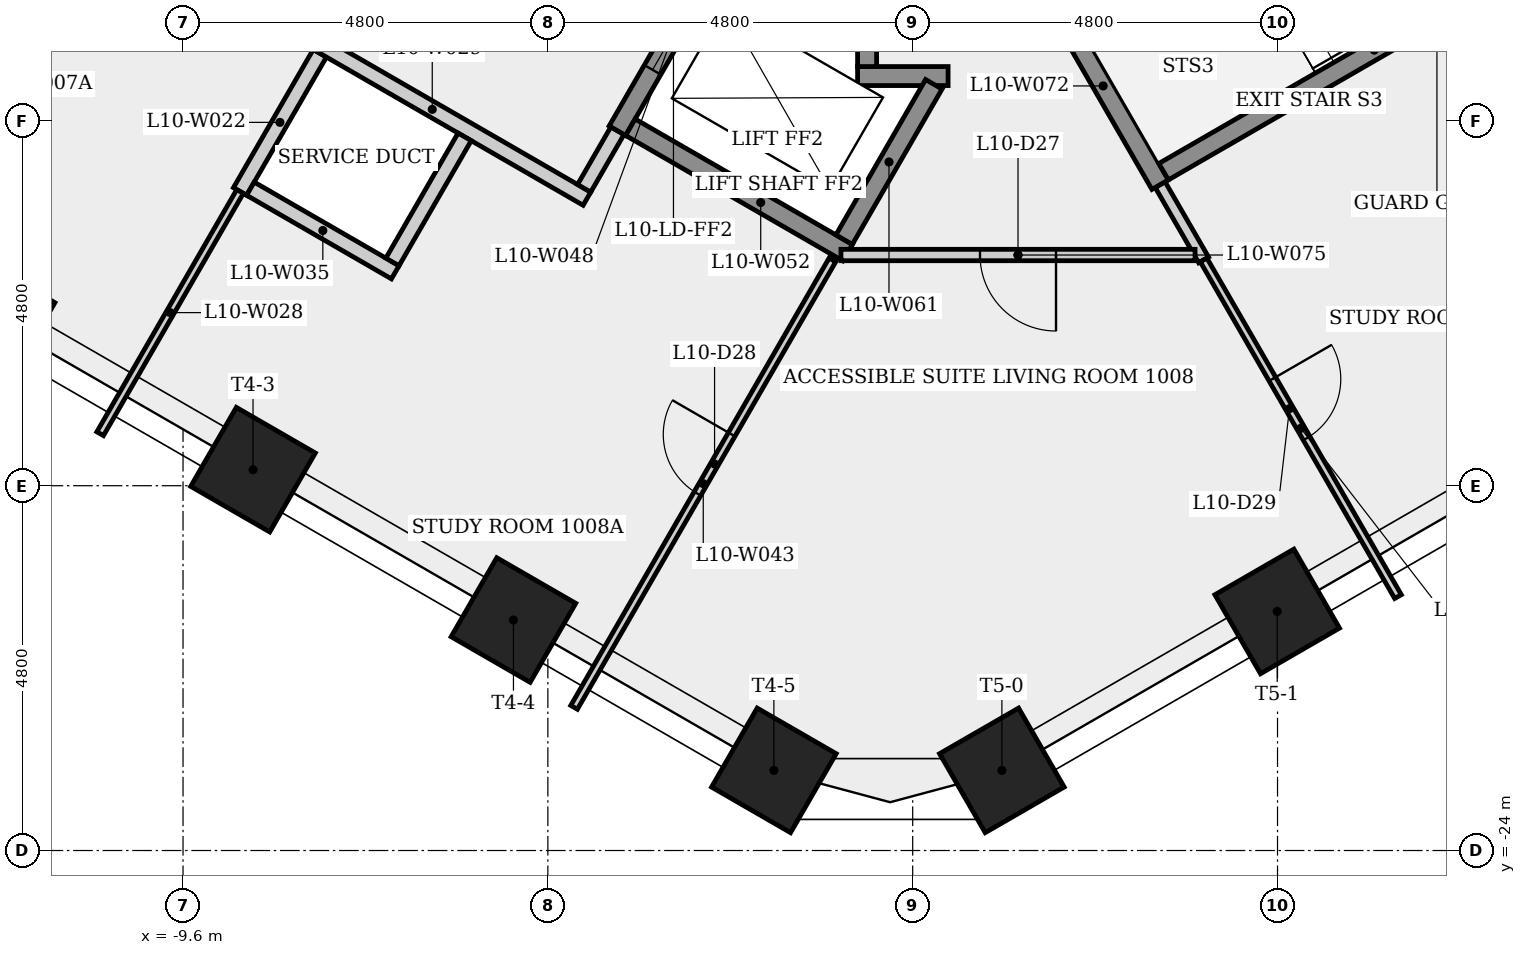
"""IFC4 building model, lengths in metres.
Left out: names, types, materials, properties, quantities, classifications, styles, units other than length and angle.
Written with IfcOpenShell. Run it as: python <this file> out.ifc"""

import sys

from ifc_helpers import new_model, si_unit, direction, frame, frame_2d, origin, origin_2d, place, context, subcontext, project, spatial, rectangle, extrude, element, fill, save


model = new_model("IFC4")
c1 = context("Model", 3, precision=1e-05, world=origin(), true_north=direction((0.0, 1.0)))
c2 = subcontext(c1, "Body", "Model", "MODEL_VIEW")
j1 = project(units=[si_unit("LENGTHUNIT", "METRE"), si_unit("PLANEANGLEUNIT", "RADIAN")], contexts=[c1])
p1 = place(None, origin())
s1 = spatial("IfcSite", under=j1, at=p1, CompositionType="ELEMENT")
p2 = place(p1, origin())
s2 = spatial("IfcBuilding", under=s1, at=p2, CompositionType="ELEMENT")
p3 = place(p2, frame((0.0, 0.0, 42.5)))
s3 = spatial("IfcBuildingStorey", under=s2, at=p3, CompositionType="ELEMENT", Elevation=42.5)
for number, where, z_axis, x_axis in (
    (1, (-12.105, -17.011, 0.0), (0.0, 0.0, 1.0), (-0.5, -0.866, 0.0)),
    (2, (-8.679, -18.989, 0.0), (0.0, 0.0, 1.0), (-0.5, -0.866, 0.0)),
    (3, (-5.253, -20.967, 0.0), (0.0, 0.0, 1.0), (-0.5, -0.866, 0.0)),
    (4, (-1.826, -22.946, 0.0), (0.0, 0.0, 1.0), (-0.5, -0.866, 0.0)),
    (5, (1.174, -22.946, 0.0), (0.0, 0.0, 1.0), (0.5, -0.866, 0.0)),
    (6, (4.796, -20.854, 0.0), (0.0, 0.0, 1.0), (0.5, -0.866, 0.0)),
):
    element("IfcColumn", number, at=place(p3, frame(where, z_axis=z_axis, x_axis=x_axis)), inside=s3, PredefinedType="COLUMN", context=c2, shape_type="SweptSolid", body=[
        extrude(rectangle(XDim=1.2, YDim=1.2, at=origin_2d()), origin(), (0.0, 0.0, 1.0), 3.4),
    ])
p4 = place(p3, frame((-8.85, -15.329, 0.0), z_axis=(0.0, 0.0, 1.0), x_axis=(0.500027713859, 0.866009402589, 0.0)))
e7 = element("IfcWall", 7, at=p4, inside=s3, PredefinedType="PLUMBINGWALL", context=c2, shape_type="SweptSolid", body=[
    extrude(rectangle(XDim=2.1, YDim=0.2, at=frame_2d((1.05, 0.0))), origin(), (0.0, 0.0, 1.0), 3.05),
])
p5 = place(p3, frame((-10.69, -18.516, 0.0), z_axis=(0.0, 0.0, 1.0), x_axis=(0.499955964762, 0.866050826049, 0.0)))
e8 = element("IfcWall", 8, at=p5, inside=s3, PredefinedType="PARTITIONING", context=c2, shape_type="SweptSolid", body=[
    extrude(rectangle(XDim=3.68, YDim=0.1, at=frame_2d((1.84, 0.0))), origin(), (0.0, 0.0, 1.0), 3.05),
])
p6 = place(p3, frame((-8.356, -13.073, 0.0), z_axis=(0.0, 0.0, 1.0), x_axis=(0.866038532462, -0.499977259774, 0.0)))
e9 = element("IfcWall", 9, at=p6, inside=s3, PredefinedType="PARTITIONING", context=c2, shape_type="SweptSolid", body=[
    extrude(rectangle(XDim=4.7, YDim=0.2, at=frame_2d((2.35, 0.0))), origin(), (0.0, 0.0, 1.0), 3.05),
])
p7 = place(p3, frame((-6.808, -16.392, 0.0), z_axis=(0.0, 0.0, 1.0), x_axis=(-0.866008176907, 0.50002983664, 0.0)))
e10 = element("IfcWall", 10, at=p7, inside=s3, PredefinedType="PLUMBINGWALL", context=c2, shape_type="SweptSolid", body=[
    extrude(rectangle(XDim=2.2, YDim=0.2, at=frame_2d((1.1, 0.0))), origin(), (0.0, 0.0, 1.0), 3.05),
])
p8 = place(p3, frame((-5.895, -14.61, 0.0), z_axis=(0.0, 0.0, 1.0), x_axis=(-0.500022797313, -0.86601224135, 0.0)))
e11 = element("IfcWall", 11, at=p8, inside=s3, PredefinedType="PLUMBINGWALL", context=c2, shape_type="SweptSolid", body=[
    extrude(rectangle(XDim=1.9, YDim=0.2, at=frame_2d((0.95, 0.0))), origin(), (0.0, 0.0, 1.0), 3.05),
])
p9 = place(p3, frame((-4.455, -22.116, 0.0), z_axis=(0.0, 0.0, 1.0), x_axis=(0.499971184285, 0.866042039906, 0.0)))
e12 = element("IfcWall", 12, at=p9, inside=s3, PredefinedType="PARTITIONING", context=c2, shape_type="SweptSolid", body=[
    extrude(rectangle(XDim=6.797, YDim=0.1, at=frame_2d((3.399, 0.0))), origin(), (0.0, 0.0, 1.0), 3.05),
])
p10 = place(p9, frame((3.247, 0.0, 0.0)))
e13 = element("IfcOpeningElement", 13, at=p10, cuts=e12, PredefinedType="OPENING", context=c2, shape_type="SweptSolid", body=[
    extrude(rectangle(XDim=0.9, YDim=2.1, at=frame_2d((0.45, 1.05))), frame((0.0, 0.06, 0.0), z_axis=(0.0, -1.0, 0.0), x_axis=(1.0, 0.0, 0.0)), (0.0, 0.0, 1.0), 0.12),
])
p11 = place(p3, frame((-3.885, -14.529, 0.0), z_axis=(0.0, 0.0, 1.0), x_axis=(-0.499859285417, -0.866106630146, 0.0)))
e14 = element("IfcWall", 14, at=p11, inside=s3, PredefinedType="PARTITIONING", context=c2, shape_type="SweptSolid", body=[
    extrude(rectangle(XDim=0.875, YDim=0.2, at=frame_2d((0.438, 0.0))), origin(), (0.0, 0.0, 1.0), 3.05),
])
p12 = place(p3, frame((-2.41, -11.974, 0.0), z_axis=(0.0, 0.0, 1.0), x_axis=(-0.500001826776, -0.866024349092, 0.0)))
e15 = element("IfcWall", 15, at=p12, inside=s3, PredefinedType="SHEAR", context=c2, shape_type="SweptSolid", body=[
    extrude(rectangle(XDim=2.95, YDim=0.25, at=frame_2d((1.475, 0.0))), origin(), (0.0, 0.0, 1.0), 3.05),
])
p13 = place(p12, frame((0.925, 0.0, 0.0)))
e16 = element("IfcOpeningElement", 16, at=p13, cuts=e15, PredefinedType="OPENING", context=c2, shape_type="SweptSolid", body=[
    extrude(rectangle(XDim=1.1, YDim=2.1, at=frame_2d((0.55, 1.05))), frame((0.0, 0.135, 0.0), z_axis=(0.0, -1.0, 0.0), x_axis=(1.0, 0.0, 0.0)), (0.0, 0.0, 1.0), 0.27),
])
p14 = place(p3, frame((-0.856, -16.133, 0.0), z_axis=(0.0, 0.0, 1.0), x_axis=(-0.866021716278, 0.500006386895, 0.0)))
e17 = element("IfcWall", 17, at=p14, inside=s3, PredefinedType="SHEAR", context=c2, shape_type="SweptSolid", body=[
    extrude(rectangle(XDim=3.3, YDim=0.25, at=frame_2d((1.65, 0.0))), origin(), (0.0, 0.0, 1.0), 3.05),
])
p15 = place(p3, frame((-0.725, -13.81, 0.0), z_axis=(0.0, 0.0, 1.0), x_axis=(1.0, 0.0, 0.0)))
e18 = element("IfcWall", 18, at=p15, inside=s3, PredefinedType="SHEAR", context=c2, shape_type="SweptSolid", body=[
    extrude(rectangle(XDim=1.191, YDim=0.25, at=frame_2d((0.595, 0.0))), origin(), (0.0, 0.0, 1.0), 3.05),
])
p16 = place(p3, frame((-0.6, -13.289, 0.0), z_axis=(0.0, 0.0, 1.0), x_axis=(0.0, -1.0, 0.0)))
e19 = element("IfcWall", 19, at=p16, inside=s3, PredefinedType="SHEAR", context=c2, shape_type="SweptSolid", body=[
    extrude(rectangle(XDim=0.396, YDim=0.25, at=frame_2d((0.198, 0.0))), origin(), (0.0, 0.0, 1.0), 3.4),
])
p17 = place(p3, frame((0.278, -13.918, 0.0), z_axis=(0.0, 0.0, 1.0), x_axis=(-0.49998806882, -0.866032292145, 0.0)))
e20 = element("IfcWall", 20, at=p17, inside=s3, PredefinedType="SHEAR", context=c2, shape_type="SweptSolid", body=[
    extrude(rectangle(XDim=2.36, YDim=0.25, at=frame_2d((1.18, 0.0))), origin(), (0.0, 0.0, 1.0), 3.4),
])
p18 = place(p3, frame((3.256, -15.239, 0.0), z_axis=(0.0, 0.0, 1.0), x_axis=(0.500018023529, -0.866014997645, 0.0)))
e21 = element("IfcWall", 21, at=p18, inside=s3, PredefinedType="PARTITIONING", context=c2, shape_type="SweptSolid", body=[
    extrude(rectangle(XDim=1.144, YDim=0.15, at=frame_2d((0.572, 0.0))), origin(), (0.0, 0.0, 1.0), 3.05),
])
p19 = place(p3, frame((3.256, -15.239, 0.0), z_axis=(0.0, 0.0, 1.0), x_axis=(-0.50002537861, 0.866010750942, 0.0)))
e22 = element("IfcWall", 22, at=p19, inside=s3, PredefinedType="SHEAR", context=c2, shape_type="SweptSolid", body=[
    extrude(rectangle(XDim=3.0, YDim=0.25, at=frame_2d((1.5, 0.0))), origin(), (0.0, 0.0, 1.0), 3.05),
])
p20 = place(p3, frame((3.715, -16.165, 0.0), z_axis=(0.0, 0.0, 1.0), x_axis=(-1.0, 0.0, 0.0)))
e23 = element("IfcWall", 23, at=p20, inside=s3, PredefinedType="PARTITIONING", context=c2, shape_type="SweptSolid", body=[
    extrude(rectangle(XDim=4.659, YDim=0.15, at=frame_2d((2.33, 0.0))), origin(), (0.0, 0.0, 1.0), 3.05),
])
p21 = place(p20, frame((1.829, 0.0, 0.0)))
e24 = element("IfcOpeningElement", 24, at=p21, cuts=e23, PredefinedType="OPENING", context=c2, shape_type="SweptSolid", body=[
    extrude(rectangle(XDim=1.0, YDim=2.1, at=frame_2d((0.5, 1.05))), frame((0.0, 0.085, 0.0), z_axis=(0.0, -1.0, 0.0), x_axis=(1.0, 0.0, 0.0)), (0.0, 0.0, 1.0), 0.17),
])
p22 = place(p3, frame((3.828, -16.229, 0.0), z_axis=(0.0, 0.0, 1.0), x_axis=(0.499984131058, -0.866034565529, 0.0)))
e25 = element("IfcWall", 25, at=p22, inside=s3, PredefinedType="PARTITIONING", context=c2, shape_type="SweptSolid", body=[
    extrude(rectangle(XDim=5.115, YDim=0.1, at=frame_2d((2.558, 0.0))), origin(), (0.0, 0.0, 1.0), 3.05),
])
p23 = place(p22, frame((1.81, 0.0, 0.0)))
e26 = element("IfcOpeningElement", 26, at=p23, cuts=e25, PredefinedType="OPENING", context=c2, shape_type="SweptSolid", body=[
    extrude(rectangle(XDim=0.9, YDim=2.1, at=frame_2d((0.45, 1.05))), frame((0.0, 0.06, 0.0), z_axis=(0.0, -1.0, 0.0), x_axis=(1.0, 0.0, 0.0)), (0.0, 0.0, 1.0), 0.12),
])
p24 = place(p3, frame((3.301, -15.068, 0.0), z_axis=(0.0, 0.0, 1.0), x_axis=(0.866035036182, 0.499983315828, 0.0)))
e27 = element("IfcWall", 27, at=p24, inside=s3, PredefinedType="SHEAR", context=c2, shape_type="SweptSolid", body=[
    extrude(rectangle(XDim=6.4, YDim=0.25, at=frame_2d((3.2, 0.0))), origin(), (0.0, 0.0, 1.0), 3.05),
])
p25 = place(p13, origin())
e28 = element("IfcDoor", 28, at=p25, inside=s3, OperationType="SLIDING_TO_LEFT", PredefinedType="DOOR", context=c2, shape_type="SweptSolid", body=[
    extrude(rectangle(XDim=1.1, YDim=2.1, at=frame_2d((0.55, 1.05))), frame((0.0, 0.025, 0.0), z_axis=(0.0, -1.0, 0.0), x_axis=(1.0, 0.0, 0.0)), (0.0, 0.0, 1.0), 0.05),
])
fill(e16, e28)
p26 = place(p21, origin())
e29 = element("IfcDoor", 29, at=p26, inside=s3, OperationType="SINGLE_SWING_LEFT", PredefinedType="DOOR", context=c2, shape_type="SweptSolid", body=[
    extrude(rectangle(XDim=1.0, YDim=2.1, at=frame_2d((0.5, 1.05))), frame((0.0, 0.025, 0.0), z_axis=(0.0, -1.0, 0.0), x_axis=(1.0, 0.0, 0.0)), (0.0, 0.0, 1.0), 0.05),
])
fill(e24, e29)
p27 = place(p10, origin())
e30 = element("IfcDoor", 30, at=p27, inside=s3, OperationType="SINGLE_SWING_RIGHT", PredefinedType="DOOR", context=c2, shape_type="SweptSolid", body=[
    extrude(rectangle(XDim=0.9, YDim=2.1, at=frame_2d((0.45, 1.05))), frame((0.0, 0.025, 0.0), z_axis=(0.0, -1.0, 0.0), x_axis=(1.0, 0.0, 0.0)), (0.0, 0.0, 1.0), 0.05),
])
fill(e13, e30)
p28 = place(p23, origin())
e31 = element("IfcDoor", 31, at=p28, inside=s3, OperationType="SINGLE_SWING_LEFT", PredefinedType="DOOR", context=c2, shape_type="SweptSolid", body=[
    extrude(rectangle(XDim=0.9, YDim=2.1, at=frame_2d((0.45, 1.05))), frame((0.0, 0.025, 0.0), z_axis=(0.0, -1.0, 0.0), x_axis=(1.0, 0.0, 0.0)), (0.0, 0.0, 1.0), 0.05),
])
fill(e26, e31)
save(model, sys.argv[1])
